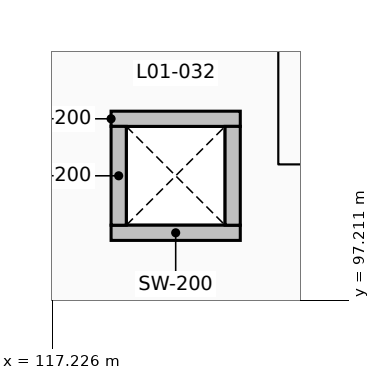
"""IFC4 building model, lengths in metres.
Left out: names, types, materials, properties, quantities, classifications, styles, units other than length and angle.
Written with IfcOpenShell. Run it as: python <this file> out.ifc"""

import sys

from ifc_helpers import new_model, si_unit, direction, frame, frame_2d, origin, place, context, subcontext, project, spatial, rectangle, extrude, element, save


model = new_model("IFC4")
c1 = context("Model", 3, precision=1e-05, world=origin(), true_north=direction((0.0, 1.0)))
c2 = subcontext(c1, "Body", "Model", "MODEL_VIEW")
j1 = project(units=[si_unit("LENGTHUNIT", "METRE"), si_unit("PLANEANGLEUNIT", "RADIAN")], contexts=[c1])
p1 = place(None, origin())
s1 = spatial("IfcSite", under=j1, at=p1, CompositionType="ELEMENT")
p2 = place(p1, origin())
s2 = spatial("IfcBuilding", under=s1, at=p2, CompositionType="ELEMENT")
p3 = place(p2, frame((0.0, 0.0, 5.4)))
s3 = spatial("IfcBuildingStorey", under=s2, at=p3, CompositionType="ELEMENT", Elevation=5.4)
for number, where, z_axis, x_axis in (
    (1, (118.0, 98.1, 0.0), (0.0, 0.0, 1.0), (1.0, 0.0, 0.0)),
    (2, (119.7, 99.6, 0.0), (0.0, 0.0, 1.0), (-1.0, 0.0, 0.0)),
):
    element("IfcWall", number, at=place(p3, frame(where, z_axis=z_axis, x_axis=x_axis)), inside=s3, PredefinedType="PARTITIONING", context=c2, shape_type="SweptSolid", body=[
        extrude(rectangle(XDim=1.7, YDim=0.2, at=frame_2d((0.85, 0.0))), origin(), (0.0, 0.0, 1.0), 4.5),
    ])
for number, where, z_axis, x_axis in (
    (3, (118.1, 98.2, 0.0), (0.0, 0.0, 1.0), (0.0, 1.0, 0.0)),
    (4, (119.6, 99.5, 0.0), (0.0, 0.0, 1.0), (0.0, -1.0, 0.0)),
):
    element("IfcWall", number, at=place(p3, frame(where, z_axis=z_axis, x_axis=x_axis)), inside=s3, PredefinedType="PARTITIONING", context=c2, shape_type="SweptSolid", body=[
        extrude(rectangle(XDim=1.3, YDim=0.2, at=frame_2d((0.65, 0.0))), origin(), (0.0, 0.0, 1.0), 4.5),
    ])
save(model, sys.argv[1])
